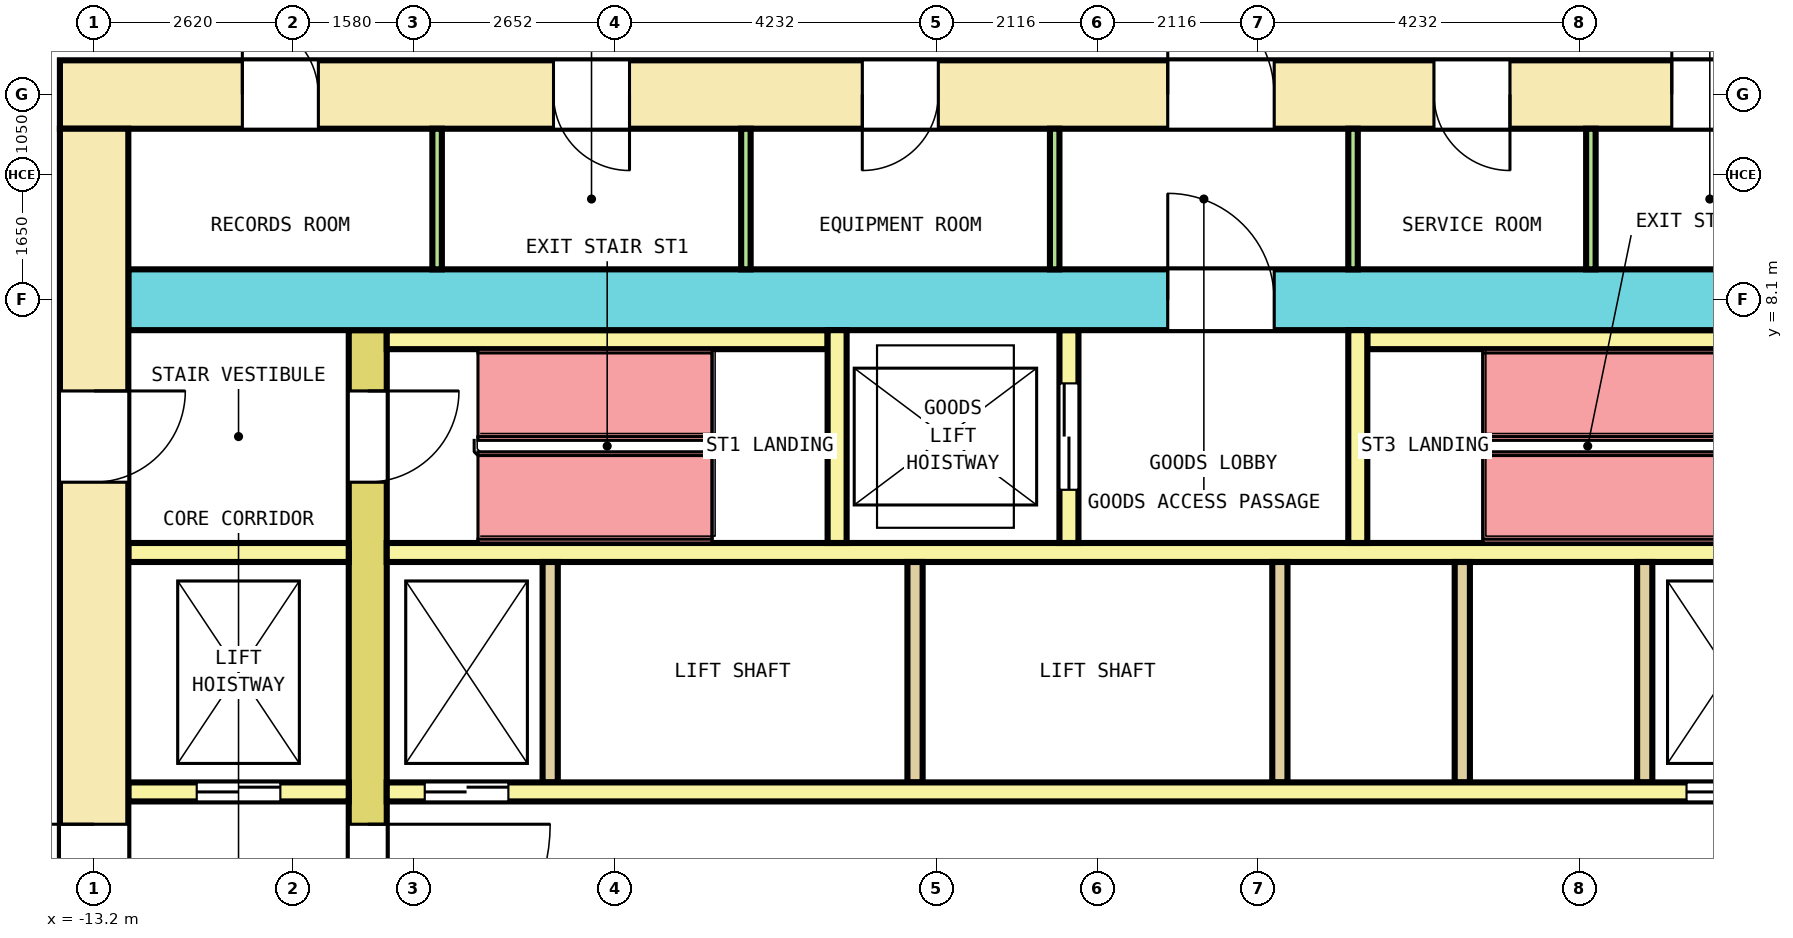
"""IFC4 building model, lengths in metres.
Left out: names, types, materials, properties, quantities, classifications, styles, units other than length and angle.
Written with IfcOpenShell. Run it as: python <this file> out.ifc"""

import sys

from ifc_helpers import new_model, si_unit, direction, frame, frame_2d, origin, place, context, subcontext, project, spatial, rectangle, extrude, element, fill, save


model = new_model("IFC4")
c1 = context("Model", 3, precision=1e-05, world=origin(), true_north=direction((0.0, 1.0)))
c2 = subcontext(c1, "Body", "Model", "MODEL_VIEW")
j1 = project(units=[si_unit("LENGTHUNIT", "METRE"), si_unit("PLANEANGLEUNIT", "RADIAN")], contexts=[c1])
p1 = place(None, origin())
s1 = spatial("IfcSite", under=j1, at=p1, CompositionType="ELEMENT")
p2 = place(p1, origin())
s2 = spatial("IfcBuilding", under=s1, at=p2, CompositionType="ELEMENT")
p3 = place(p2, frame((0.0, 0.0, 63.0)))
s3 = spatial("IfcBuildingStorey", under=s2, at=p3, CompositionType="ELEMENT", Elevation=63.0)
p4 = place(p3, frame((-13.65, 10.8, 0.0), z_axis=(0.0, 0.0, 1.0), x_axis=(1.0, 0.0, 0.0)))
e1 = element("IfcWall", 1, at=p4, inside=s3, PredefinedType="SHEAR", context=c2, shape_type="SweptSolid", body=[
    extrude(rectangle(XDim=27.3, YDim=0.9, at=frame_2d((13.65, 0.0))), origin(), (0.0, 0.0, 1.0), 4.1),
])
p5 = place(p4, frame((2.4, 0.0, 0.0)))
e2 = element("IfcOpeningElement", 2, at=p5, cuts=e1, PredefinedType="OPENING", context=c2, shape_type="SweptSolid", body=[
    extrude(rectangle(XDim=1.0, YDim=2.1, at=frame_2d((0.5, 1.05))), frame((0.0, 0.46, 0.0), z_axis=(0.0, -1.0, 0.0), x_axis=(1.0, 0.0, 0.0)), (0.0, 0.0, 1.0), 0.92),
])
p6 = place(p4, frame((6.494, 0.0, 0.0)))
e3 = element("IfcOpeningElement", 3, at=p6, cuts=e1, PredefinedType="OPENING", context=c2, shape_type="SweptSolid", body=[
    extrude(rectangle(XDim=1.0, YDim=2.1, at=frame_2d((0.5, 1.05))), frame((0.0, 0.46, 0.0), z_axis=(0.0, -1.0, 0.0), x_axis=(1.0, 0.0, 0.0)), (0.0, 0.0, 1.0), 0.92),
])
p7 = place(p4, frame((10.556, 0.0, 0.0)))
e4 = element("IfcOpeningElement", 4, at=p7, cuts=e1, PredefinedType="OPENING", context=c2, shape_type="SweptSolid", body=[
    extrude(rectangle(XDim=1.0, YDim=2.1, at=frame_2d((0.5, 1.05))), frame((0.0, 0.46, 0.0), z_axis=(0.0, -1.0, 0.0), x_axis=(1.0, 0.0, 0.0)), (0.0, 0.0, 1.0), 0.92),
])
p8 = place(p4, frame((18.077, 0.0, 0.0)))
e5 = element("IfcOpeningElement", 5, at=p8, cuts=e1, PredefinedType="OPENING", context=c2, shape_type="SweptSolid", body=[
    extrude(rectangle(XDim=1.0, YDim=2.1, at=frame_2d((0.5, 1.05))), frame((0.0, 0.46, 0.0), z_axis=(0.0, -1.0, 0.0), x_axis=(1.0, 0.0, 0.0)), (0.0, 0.0, 1.0), 0.92),
])
p9 = place(p4, frame((21.206, 0.0, 0.0)))
e6 = element("IfcOpeningElement", 6, at=p9, cuts=e1, PredefinedType="OPENING", context=c2, shape_type="SweptSolid", body=[
    extrude(rectangle(XDim=1.0, YDim=2.1, at=frame_2d((0.5, 1.05))), frame((0.0, 0.46, 0.0), z_axis=(0.0, -1.0, 0.0), x_axis=(1.0, 0.0, 0.0)), (0.0, 0.0, 1.0), 0.92),
])
p10 = place(p4, frame((24.367, 0.0, 0.0)))
e7 = element("IfcOpeningElement", 7, at=p10, cuts=e1, PredefinedType="OPENING", context=c2, shape_type="SweptSolid", body=[
    extrude(rectangle(XDim=1.0, YDim=2.1, at=frame_2d((0.5, 1.05))), frame((0.0, 0.46, 0.0), z_axis=(0.0, -1.0, 0.0), x_axis=(1.0, 0.0, 0.0)), (0.0, 0.0, 1.0), 0.92),
])
p11 = place(p4, frame((14.575, 0.0, 0.0)))
e8 = element("IfcOpeningElement", 8, at=p11, cuts=e1, PredefinedType="OPENING", context=c2, shape_type="SweptSolid", body=[
    extrude(rectangle(XDim=1.4, YDim=2.1, at=frame_2d((0.7, 1.05))), frame((0.0, 0.46, 0.0), z_axis=(0.0, -1.0, 0.0), x_axis=(1.0, 0.0, 0.0)), (0.0, 0.0, 1.0), 0.92),
])
p12 = place(p3, frame((-13.2, -10.35, 0.0), z_axis=(0.0, 0.0, 1.0), x_axis=(0.0, 1.0, 0.0)))
e9 = element("IfcWall", 9, at=p12, inside=s3, PredefinedType="SHEAR", context=c2, shape_type="SweptSolid", body=[
    extrude(rectangle(XDim=20.7, YDim=0.9, at=frame_2d((10.35, 0.0))), origin(), (0.0, 0.0, 1.0), 4.1),
])
p13 = place(p12, frame((9.15, 0.0, 0.0)))
e10 = element("IfcOpeningElement", 10, at=p13, cuts=e9, PredefinedType="OPENING", context=c2, shape_type="SweptSolid", body=[
    extrude(rectangle(XDim=2.4, YDim=2.1, at=frame_2d((1.2, 1.05))), frame((0.0, 0.46, 0.0), z_axis=(0.0, -1.0, 0.0), x_axis=(1.0, 0.0, 0.0)), (0.0, 0.0, 1.0), 0.92),
])
p14 = place(p12, frame((16.05, 0.0, 0.0)))
e11 = element("IfcOpeningElement", 11, at=p14, cuts=e9, PredefinedType="OPENING", context=c2, shape_type="SweptSolid", body=[
    extrude(rectangle(XDim=1.2, YDim=2.1, at=frame_2d((0.6, 1.05))), frame((0.0, 0.46, 0.0), z_axis=(0.0, -1.0, 0.0), x_axis=(1.0, 0.0, 0.0)), (0.0, 0.0, 1.0), 0.92),
])
p15 = place(p12, frame((3.45, 0.0, 0.0)))
e12 = element("IfcOpeningElement", 12, at=p15, cuts=e9, PredefinedType="OPENING", context=c2, shape_type="SweptSolid", body=[
    extrude(rectangle(XDim=1.2, YDim=2.1, at=frame_2d((0.6, 1.05))), frame((0.0, 0.46, 0.0), z_axis=(0.0, -1.0, 0.0), x_axis=(1.0, 0.0, 0.0)), (0.0, 0.0, 1.0), 0.92),
])
p16 = place(p3, frame((-12.75, 8.1, 0.0), z_axis=(0.0, 0.0, 1.0), x_axis=(1.0, 0.0, 0.0)))
e13 = element("IfcWall", 13, at=p16, inside=s3, PredefinedType="SHEAR", context=c2, shape_type="SweptSolid", body=[
    extrude(rectangle(XDim=25.5, YDim=0.8, at=frame_2d((12.75, 0.0))), origin(), (0.0, 0.0, 1.0), 4.1),
])
p17 = place(p16, frame((13.675, 0.0, 0.0)))
e14 = element("IfcOpeningElement", 14, at=p17, cuts=e13, PredefinedType="OPENING", context=c2, shape_type="SweptSolid", body=[
    extrude(rectangle(XDim=1.4, YDim=2.1, at=frame_2d((0.7, 1.05))), frame((0.0, 0.41, 0.0), z_axis=(0.0, -1.0, 0.0), x_axis=(1.0, 0.0, 0.0)), (0.0, 0.0, 1.0), 0.82),
])
p18 = place(p3, frame((-9.6, -7.7, 0.0), z_axis=(0.0, 0.0, 1.0), x_axis=(0.0, 1.0, 0.0)))
e15 = element("IfcWall", 15, at=p18, inside=s3, PredefinedType="SHEAR", context=c2, shape_type="SweptSolid", body=[
    extrude(rectangle(XDim=15.4, YDim=0.5, at=frame_2d((7.7, 0.0))), origin(), (0.0, 0.0, 1.0), 4.1),
])
p19 = place(p18, frame((6.5, 0.0, 0.0)))
e16 = element("IfcOpeningElement", 16, at=p19, cuts=e15, PredefinedType="OPENING", context=c2, shape_type="SweptSolid", body=[
    extrude(rectangle(XDim=2.4, YDim=2.1, at=frame_2d((1.2, 1.05))), frame((0.0, 0.26, 0.0), z_axis=(0.0, -1.0, 0.0), x_axis=(1.0, 0.0, 0.0)), (0.0, 0.0, 1.0), 0.52),
])
p20 = place(p18, frame((13.4, 0.0, 0.0)))
e17 = element("IfcOpeningElement", 17, at=p20, cuts=e15, PredefinedType="OPENING", context=c2, shape_type="SweptSolid", body=[
    extrude(rectangle(XDim=1.2, YDim=2.1, at=frame_2d((0.6, 1.05))), frame((0.0, 0.26, 0.0), z_axis=(0.0, -1.0, 0.0), x_axis=(1.0, 0.0, 0.0)), (0.0, 0.0, 1.0), 0.52),
])
p21 = place(p18, frame((0.8, 0.0, 0.0)))
e18 = element("IfcOpeningElement", 18, at=p21, cuts=e15, PredefinedType="OPENING", context=c2, shape_type="SweptSolid", body=[
    extrude(rectangle(XDim=1.2, YDim=2.1, at=frame_2d((0.6, 1.05))), frame((0.0, 0.26, 0.0), z_axis=(0.0, -1.0, 0.0), x_axis=(1.0, 0.0, 0.0)), (0.0, 0.0, 1.0), 0.52),
])
p22 = place(p3, frame((-12.75, 1.625, 0.0), z_axis=(0.0, 0.0, 1.0), x_axis=(1.0, 0.0, 0.0)))
e19 = element("IfcWall", 19, at=p22, inside=s3, PredefinedType="SOLIDWALL", context=c2, shape_type="SweptSolid", body=[
    extrude(rectangle(XDim=2.9, YDim=0.25, at=frame_2d((1.45, 0.0))), origin(), (0.0, 0.0, 1.0), 4.1),
])
p23 = place(p22, frame((0.9, 0.0, 0.0)))
e20 = element("IfcOpeningElement", 20, at=p23, cuts=e19, PredefinedType="OPENING", context=c2, shape_type="SweptSolid", body=[
    extrude(rectangle(XDim=1.1, YDim=2.1, at=frame_2d((0.55, 1.05))), frame((0.0, 0.135, 0.0), z_axis=(0.0, -1.0, 0.0), x_axis=(1.0, 0.0, 0.0)), (0.0, 0.0, 1.0), 0.27),
])
p24 = place(p3, frame((-9.35, 1.625, 0.0), z_axis=(0.0, 0.0, 1.0), x_axis=(1.0, 0.0, 0.0)))
e21 = element("IfcWall", 21, at=p24, inside=s3, PredefinedType="SOLIDWALL", context=c2, shape_type="SweptSolid", body=[
    extrude(rectangle(XDim=18.7, YDim=0.25, at=frame_2d((9.35, 0.0))), origin(), (0.0, 0.0, 1.0), 4.1),
])
p25 = place(p24, frame((0.5, 0.0, 0.0)))
e22 = element("IfcOpeningElement", 22, at=p25, cuts=e21, PredefinedType="OPENING", context=c2, shape_type="SweptSolid", body=[
    extrude(rectangle(XDim=1.1, YDim=2.1, at=frame_2d((0.55, 1.05))), frame((0.0, 0.135, 0.0), z_axis=(0.0, -1.0, 0.0), x_axis=(1.0, 0.0, 0.0)), (0.0, 0.0, 1.0), 0.27),
])
p26 = place(p24, frame((17.1, 0.0, 0.0)))
e23 = element("IfcOpeningElement", 23, at=p26, cuts=e21, PredefinedType="OPENING", context=c2, shape_type="SweptSolid", body=[
    extrude(rectangle(XDim=1.1, YDim=2.1, at=frame_2d((0.55, 1.05))), frame((0.0, 0.135, 0.0), z_axis=(0.0, -1.0, 0.0), x_axis=(1.0, 0.0, 0.0)), (0.0, 0.0, 1.0), 0.27),
])
p27 = place(p3, frame((-12.75, 4.775, 0.0), z_axis=(0.0, 0.0, 1.0), x_axis=(1.0, 0.0, 0.0)))
e24 = element("IfcWall", 24, at=p27, inside=s3, PredefinedType="SOLIDWALL", context=c2, shape_type="SweptSolid", body=[
    extrude(rectangle(XDim=2.9, YDim=0.25, at=frame_2d((1.45, 0.0))), origin(), (0.0, 0.0, 1.0), 4.1),
])
p28 = place(p3, frame((-9.35, 4.775, 0.0), z_axis=(0.0, 0.0, 1.0), x_axis=(1.0, 0.0, 0.0)))
e25 = element("IfcWall", 25, at=p28, inside=s3, PredefinedType="SOLIDWALL", context=c2, shape_type="SweptSolid", body=[
    extrude(rectangle(XDim=18.7, YDim=0.25, at=frame_2d((9.35, 0.0))), origin(), (0.0, 0.0, 1.0), 4.1),
])
for number, where, z_axis, x_axis in (
    (26, (-7.2, 1.75, 0.0), (0.0, 0.0, 1.0), (0.0, 1.0, 0.0)),
    (27, (-2.4, 1.75, 0.0), (0.0, 0.0, 1.0), (0.0, 1.0, 0.0)),
    (28, (2.4, 1.75, 0.0), (0.0, 0.0, 1.0), (0.0, 1.0, 0.0)),
    (29, (4.8, 1.75, 0.0), (0.0, 0.0, 1.0), (0.0, 1.0, 0.0)),
    (30, (7.2, 1.75, 0.0), (0.0, 0.0, 1.0), (0.0, 1.0, 0.0)),
):
    element("IfcWall", number, at=place(p3, frame(where, z_axis=z_axis, x_axis=x_axis)), inside=s3, PredefinedType="SOLIDWALL", context=c2, shape_type="SweptSolid", body=[
        extrude(rectangle(XDim=2.9, YDim=0.2, at=frame_2d((1.45, 0.0))), origin(), (0.0, 0.0, 1.0), 4.1),
    ])
for number, where, z_axis, x_axis in (
    (31, (-9.35, 7.575, 0.0), (0.0, 0.0, 1.0), (1.0, 0.0, 0.0)),
    (32, (3.55, 7.575, 0.0), (0.0, 0.0, 1.0), (1.0, 0.0, 0.0)),
):
    element("IfcWall", number, at=place(p3, frame(where, z_axis=z_axis, x_axis=x_axis)), inside=s3, PredefinedType="SOLIDWALL", context=c2, shape_type="SweptSolid", body=[
        extrude(rectangle(XDim=5.8, YDim=0.25, at=frame_2d((2.9, 0.0))), origin(), (0.0, 0.0, 1.0), 4.1),
    ])
p29 = place(p3, frame((-3.425, 4.9, 0.0), z_axis=(0.0, 0.0, 1.0), x_axis=(0.0, 1.0, 0.0)))
e33 = element("IfcWall", 33, at=p29, inside=s3, PredefinedType="SOLIDWALL", context=c2, shape_type="SweptSolid", body=[
    extrude(rectangle(XDim=2.8, YDim=0.25, at=frame_2d((1.4, 0.0))), origin(), (0.0, 0.0, 1.0), 4.1),
])
p30 = place(p3, frame((-0.375, 4.9, 0.0), z_axis=(0.0, 0.0, 1.0), x_axis=(0.0, 1.0, 0.0)))
e34 = element("IfcWall", 34, at=p30, inside=s3, PredefinedType="SOLIDWALL", context=c2, shape_type="SweptSolid", body=[
    extrude(rectangle(XDim=2.8, YDim=0.25, at=frame_2d((1.4, 0.0))), origin(), (0.0, 0.0, 1.0), 4.1),
])
p31 = place(p30, frame((0.7, 0.0, 0.0)))
e35 = element("IfcOpeningElement", 35, at=p31, cuts=e34, PredefinedType="OPENING", context=c2, shape_type="SweptSolid", body=[
    extrude(rectangle(XDim=1.4, YDim=2.1, at=frame_2d((0.7, 1.05))), frame((0.0, 0.135, 0.0), z_axis=(0.0, -1.0, 0.0), x_axis=(1.0, 0.0, 0.0)), (0.0, 0.0, 1.0), 0.27),
])
p32 = place(p3, frame((3.425, 4.9, 0.0), z_axis=(0.0, 0.0, 1.0), x_axis=(0.0, 1.0, 0.0)))
e36 = element("IfcWall", 36, at=p32, inside=s3, PredefinedType="SOLIDWALL", context=c2, shape_type="SweptSolid", body=[
    extrude(rectangle(XDim=2.8, YDim=0.25, at=frame_2d((1.4, 0.0))), origin(), (0.0, 0.0, 1.0), 4.1),
])
for number, where, z_axis, x_axis in (
    (37, (-8.688, 8.5, 0.0), (0.0, 0.0, 1.0), (0.0, 1.0, 0.0)),
    (38, (-4.625, 8.5, 0.0), (0.0, 0.0, 1.0), (0.0, 1.0, 0.0)),
    (39, (-0.562, 8.5, 0.0), (0.0, 0.0, 1.0), (0.0, 1.0, 0.0)),
    (40, (3.363, 8.5, 0.0), (0.0, 0.0, 1.0), (0.0, 1.0, 0.0)),
    (41, (6.492, 8.5, 0.0), (0.0, 0.0, 1.0), (0.0, 1.0, 0.0)),
):
    element("IfcWall", number, at=place(p3, frame(where, z_axis=z_axis, x_axis=x_axis)), inside=s3, PredefinedType="PARTITIONING", context=c2, shape_type="SweptSolid", body=[
        extrude(rectangle(XDim=1.85, YDim=0.125, at=frame_2d((0.925, 0.0))), origin(), (0.0, 0.0, 1.0), 4.1),
    ])
p33 = place(p23, origin())
e42 = element("IfcDoor", 42, at=p33, inside=s3, OperationType="DOUBLE_DOOR_SLIDING", PredefinedType="DOOR", context=c2, shape_type="SweptSolid", body=[
    extrude(rectangle(XDim=1.1, YDim=2.1, at=frame_2d((0.55, 1.05))), frame((0.0, 0.075, 0.0), z_axis=(0.0, -1.0, 0.0), x_axis=(1.0, 0.0, 0.0)), (0.0, 0.0, 1.0), 0.15),
])
fill(e20, e42)
p34 = place(p25, origin())
e43 = element("IfcDoor", 43, at=p34, inside=s3, OperationType="DOUBLE_DOOR_SLIDING", PredefinedType="DOOR", context=c2, shape_type="SweptSolid", body=[
    extrude(rectangle(XDim=1.1, YDim=2.1, at=frame_2d((0.55, 1.05))), frame((0.0, 0.075, 0.0), z_axis=(0.0, -1.0, 0.0), x_axis=(1.0, 0.0, 0.0)), (0.0, 0.0, 1.0), 0.15),
])
fill(e22, e43)
p35 = place(p26, origin())
e44 = element("IfcDoor", 44, at=p35, inside=s3, OperationType="DOUBLE_DOOR_SLIDING", PredefinedType="DOOR", context=c2, shape_type="SweptSolid", body=[
    extrude(rectangle(XDim=1.1, YDim=2.1, at=frame_2d((0.55, 1.05))), frame((0.0, 0.075, 0.0), z_axis=(0.0, -1.0, 0.0), x_axis=(1.0, 0.0, 0.0)), (0.0, 0.0, 1.0), 0.15),
])
fill(e23, e44)
p36 = place(p31, origin())
e45 = element("IfcDoor", 45, at=p36, inside=s3, OperationType="DOUBLE_DOOR_SLIDING", PredefinedType="DOOR", context=c2, shape_type="SweptSolid", body=[
    extrude(rectangle(XDim=1.4, YDim=2.1, at=frame_2d((0.7, 1.05))), frame((0.0, 0.075, 0.0), z_axis=(0.0, -1.0, 0.0), x_axis=(1.0, 0.0, 0.0)), (0.0, 0.0, 1.0), 0.15),
])
fill(e35, e45)
p37 = place(p19, origin())
e46 = element("IfcDoor", 46, at=p37, inside=s3, OperationType="DOUBLE_DOOR_SINGLE_SWING", PredefinedType="DOOR", context=c2, shape_type="SweptSolid", body=[
    extrude(rectangle(XDim=2.4, YDim=2.1, at=frame_2d((1.2, 1.05))), frame((0.0, 0.2, 0.0), z_axis=(0.0, -1.0, 0.0), x_axis=(1.0, 0.0, 0.0)), (0.0, 0.0, 1.0), 0.4),
])
fill(e16, e46)
p38 = place(p13, origin())
e47 = element("IfcDoor", 47, at=p38, inside=s3, OperationType="DOUBLE_DOOR_SINGLE_SWING", PredefinedType="DOOR", context=c2, shape_type="SweptSolid", body=[
    extrude(rectangle(XDim=2.4, YDim=2.1, at=frame_2d((1.2, 1.05))), frame((0.0, 0.3, 0.0), z_axis=(0.0, -1.0, 0.0), x_axis=(1.0, 0.0, 0.0)), (0.0, 0.0, 1.0), 0.6),
])
fill(e10, e47)
p39 = place(p20, origin())
e48 = element("IfcDoor", 48, at=p39, inside=s3, OperationType="SINGLE_SWING_LEFT", PredefinedType="DOOR", context=c2, shape_type="SweptSolid", body=[
    extrude(rectangle(XDim=1.2, YDim=2.1, at=frame_2d((0.6, 1.05))), frame((0.0, 0.2, 0.0), z_axis=(0.0, -1.0, 0.0), x_axis=(1.0, 0.0, 0.0)), (0.0, 0.0, 1.0), 0.4),
])
fill(e17, e48)
p40 = place(p14, origin())
e49 = element("IfcDoor", 49, at=p40, inside=s3, OperationType="SINGLE_SWING_RIGHT", PredefinedType="DOOR", context=c2, shape_type="SweptSolid", body=[
    extrude(rectangle(XDim=1.2, YDim=2.1, at=frame_2d((0.6, 1.05))), frame((0.0, 0.3, 0.0), z_axis=(0.0, -1.0, 0.0), x_axis=(1.0, 0.0, 0.0)), (0.0, 0.0, 1.0), 0.6),
])
fill(e11, e49)
p41 = place(p17, origin())
e50 = element("IfcDoor", 50, at=p41, inside=s3, OperationType="DOUBLE_DOOR_SINGLE_SWING", PredefinedType="DOOR", context=c2, shape_type="SweptSolid", body=[
    extrude(rectangle(XDim=1.4, YDim=2.1, at=frame_2d((0.7, 1.05))), frame((0.0, 0.3, 0.0), z_axis=(0.0, -1.0, 0.0), x_axis=(1.0, 0.0, 0.0)), (0.0, 0.0, 1.0), 0.6),
])
fill(e14, e50)
p42 = place(p5, origin())
e51 = element("IfcDoor", 51, at=p42, inside=s3, OperationType="SINGLE_SWING_RIGHT", PredefinedType="DOOR", context=c2, shape_type="SweptSolid", body=[
    extrude(rectangle(XDim=1.0, YDim=2.1, at=frame_2d((0.5, 1.05))), frame((0.0, 0.3, 0.0), z_axis=(0.0, -1.0, 0.0), x_axis=(1.0, 0.0, 0.0)), (0.0, 0.0, 1.0), 0.6),
])
fill(e2, e51)
p43 = place(p6, origin())
e52 = element("IfcDoor", 52, at=p43, inside=s3, OperationType="SINGLE_SWING_LEFT", PredefinedType="DOOR", context=c2, shape_type="SweptSolid", body=[
    extrude(rectangle(XDim=1.0, YDim=2.1, at=frame_2d((0.5, 1.05))), frame((0.0, 0.3, 0.0), z_axis=(0.0, -1.0, 0.0), x_axis=(1.0, 0.0, 0.0)), (0.0, 0.0, 1.0), 0.6),
])
fill(e3, e52)
p44 = place(p7, origin())
e53 = element("IfcDoor", 53, at=p44, inside=s3, OperationType="SINGLE_SWING_RIGHT", PredefinedType="DOOR", context=c2, shape_type="SweptSolid", body=[
    extrude(rectangle(XDim=1.0, YDim=2.1, at=frame_2d((0.5, 1.05))), frame((0.0, 0.3, 0.0), z_axis=(0.0, -1.0, 0.0), x_axis=(1.0, 0.0, 0.0)), (0.0, 0.0, 1.0), 0.6),
])
fill(e4, e53)
p45 = place(p8, origin())
e54 = element("IfcDoor", 54, at=p45, inside=s3, OperationType="SINGLE_SWING_LEFT", PredefinedType="DOOR", context=c2, shape_type="SweptSolid", body=[
    extrude(rectangle(XDim=1.0, YDim=2.1, at=frame_2d((0.5, 1.05))), frame((0.0, 0.3, 0.0), z_axis=(0.0, -1.0, 0.0), x_axis=(1.0, 0.0, 0.0)), (0.0, 0.0, 1.0), 0.6),
])
fill(e5, e54)
p46 = place(p9, origin())
e55 = element("IfcDoor", 55, at=p46, inside=s3, OperationType="SINGLE_SWING_RIGHT", PredefinedType="DOOR", context=c2, shape_type="SweptSolid", body=[
    extrude(rectangle(XDim=1.0, YDim=2.1, at=frame_2d((0.5, 1.05))), frame((0.0, 0.3, 0.0), z_axis=(0.0, -1.0, 0.0), x_axis=(1.0, 0.0, 0.0)), (0.0, 0.0, 1.0), 0.6),
])
fill(e6, e55)
p47 = place(p11, origin())
e56 = element("IfcDoor", 56, at=p47, inside=s3, OperationType="DOUBLE_DOOR_SINGLE_SWING", PredefinedType="DOOR", context=c2, shape_type="SweptSolid", body=[
    extrude(rectangle(XDim=1.4, YDim=2.1, at=frame_2d((0.7, 1.05))), frame((0.0, 0.3, 0.0), z_axis=(0.0, -1.0, 0.0), x_axis=(1.0, 0.0, 0.0)), (0.0, 0.0, 1.0), 0.6),
])
fill(e8, e56)
save(model, sys.argv[1])
